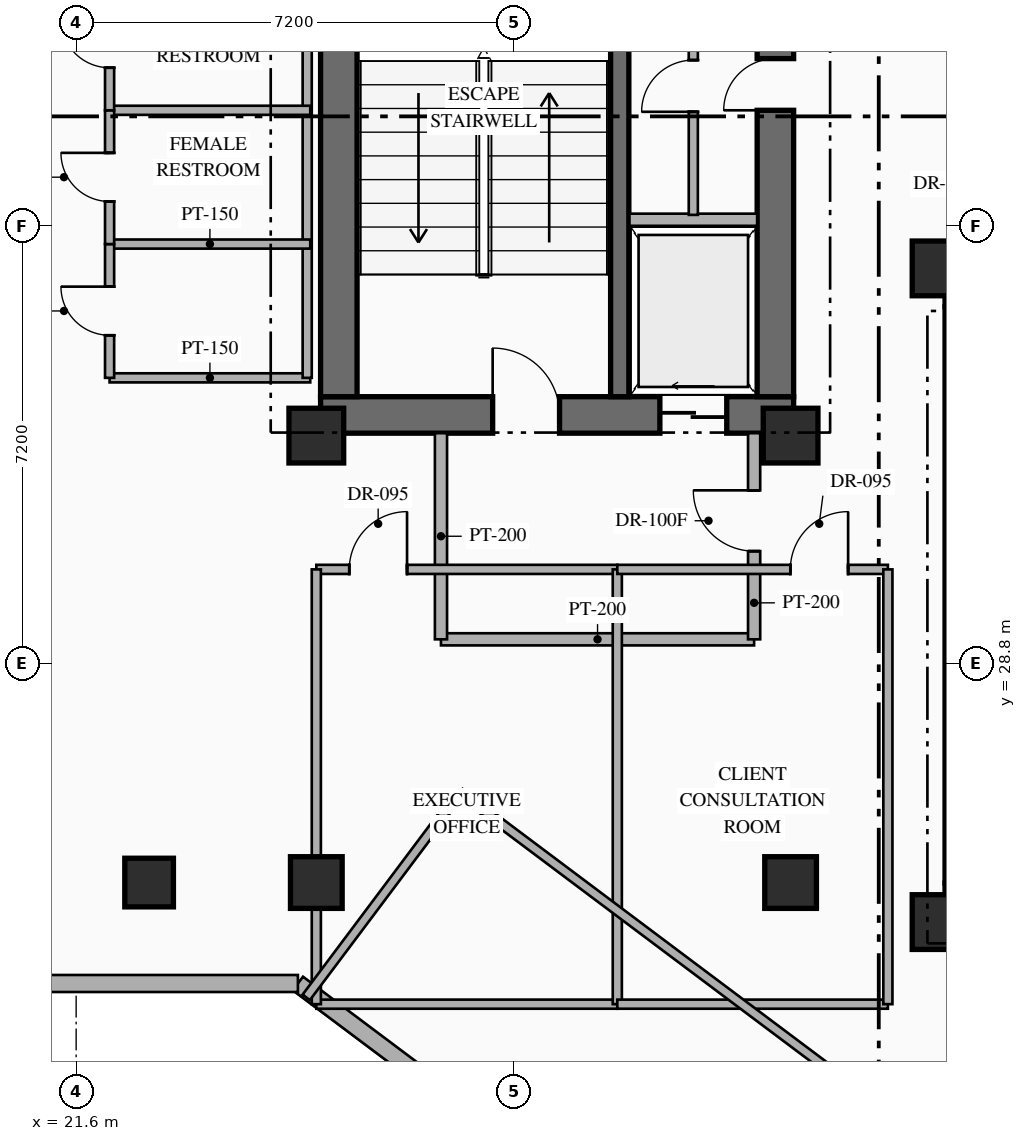
"""IFC4 building model, lengths in metres.
Left out: names, types, materials, properties, quantities, classifications, styles, units other than length and angle.
Written with IfcOpenShell. Run it as: python <this file> out.ifc"""

import sys

from ifc_helpers import new_model, si_unit, direction, frame, frame_2d, origin, origin_2d, place, context, subcontext, project, spatial, rectangle, hollow_rectangle, extrude, element, fill, save


model = new_model("IFC4")
c1 = context("Model", 3, precision=1e-05, world=origin(), true_north=direction((0.0, 1.0)))
c2 = subcontext(c1, "Body", "Model", "MODEL_VIEW")
j1 = project(units=[si_unit("LENGTHUNIT", "METRE"), si_unit("PLANEANGLEUNIT", "RADIAN")], contexts=[c1])
p1 = place(None, origin())
s1 = spatial("IfcSite", under=j1, at=p1, CompositionType="ELEMENT")
p2 = place(p1, origin())
s2 = spatial("IfcBuilding", under=s1, at=p2, CompositionType="ELEMENT")
p3 = place(p2, frame((0.0, 0.0, 142.05)))
s3 = spatial("IfcBuildingStorey", under=s2, at=p3, CompositionType="ELEMENT", Elevation=142.05)
p4 = place(p3, frame((25.62, 32.89, 0.0), z_axis=(0.0, 0.0, 1.0), x_axis=(1.0, 0.0, 0.0)))
e1 = element("IfcWall", 1, at=p4, inside=s3, PredefinedType="SHEAR", context=c2, shape_type="SweptSolid", body=[
    extrude(rectangle(XDim=7.78, YDim=0.6, at=frame_2d((3.89, 0.0))), origin(), (0.0, 0.0, 1.0), 3.6),
])
p5 = place(p4, frame((2.83, 0.0, 0.0)))
e2 = element("IfcOpeningElement", 2, at=p5, cuts=e1, PredefinedType="OPENING", context=c2, shape_type="SweptSolid", body=[
    extrude(rectangle(XDim=1.1, YDim=2.2, at=frame_2d((0.55, 1.1))), frame((0.0, 0.31, 0.0), z_axis=(0.0, -1.0, 0.0), x_axis=(1.0, 0.0, 0.0)), (0.0, 0.0, 1.0), 0.62),
])
p6 = place(p4, frame((5.58, 0.0, 0.0)))
e3 = element("IfcOpeningElement", 3, at=p6, cuts=e1, PredefinedType="OPENING", context=c2, shape_type="SweptSolid", body=[
    extrude(rectangle(XDim=1.1, YDim=2.15, at=frame_2d((0.55, 1.075))), frame((0.0, 0.31, 0.0), z_axis=(0.0, -1.0, 0.0), x_axis=(1.0, 0.0, 0.0)), (0.0, 0.0, 1.0), 0.62),
])
p7 = place(p3, frame((25.92, 33.19, 0.0), z_axis=(0.0, 0.0, 1.0), x_axis=(0.0, 1.0, 0.0)))
e4 = element("IfcWall", 4, at=p7, inside=s3, PredefinedType="SHEAR", context=c2, shape_type="SweptSolid", body=[
    extrude(rectangle(XDim=9.48, YDim=0.6, at=frame_2d((4.74, 0.0))), origin(), (0.0, 0.0, 1.0), 3.6),
])
p8 = place(p3, frame((33.1, 33.19, 0.0), z_axis=(0.0, 0.0, 1.0), x_axis=(0.0, 1.0, 0.0)))
e5 = element("IfcWall", 5, at=p8, inside=s3, PredefinedType="SHEAR", context=c2, shape_type="SweptSolid", body=[
    extrude(rectangle(XDim=9.48, YDim=0.6, at=frame_2d((4.74, 0.0))), origin(), (0.0, 0.0, 1.0), 3.6),
])
p9 = place(p8, frame((4.71, 0.0, 0.0)))
e6 = element("IfcOpeningElement", 6, at=p9, cuts=e5, PredefinedType="OPENING", context=c2, shape_type="SweptSolid", body=[
    extrude(rectangle(XDim=0.85, YDim=2.08, at=frame_2d((0.425, 1.04))), frame((0.0, 0.31, 0.0), z_axis=(0.0, -1.0, 0.0), x_axis=(1.0, 0.0, 0.0)), (0.0, 0.0, 1.0), 0.62),
])
p10 = place(p8, frame((7.76, 0.0, 0.0)))
e7 = element("IfcOpeningElement", 7, at=p10, cuts=e5, PredefinedType="OPENING", context=c2, shape_type="SweptSolid", body=[
    extrude(rectangle(XDim=0.85, YDim=2.08, at=frame_2d((0.425, 1.04))), frame((0.0, 0.31, 0.0), z_axis=(0.0, -1.0, 0.0), x_axis=(1.0, 0.0, 0.0)), (0.0, 0.0, 1.0), 0.62),
])
p11 = place(p3, frame((30.54, 33.19, 0.0), z_axis=(0.0, 0.0, 1.0), x_axis=(0.0, 1.0, 0.0)))
e8 = element("IfcWall", 8, at=p11, inside=s3, PredefinedType="SHEAR", context=c2, shape_type="SweptSolid", body=[
    extrude(rectangle(XDim=9.48, YDim=0.3, at=frame_2d((4.74, 0.0))), origin(), (0.0, 0.0, 1.0), 3.6),
])
p12 = place(p3, frame((35.89, 24.89, 0.0), z_axis=(0.0, 0.0, 1.0), x_axis=(1.0, 0.0, 0.0)))
e9 = element("IfcWall", 9, at=p12, inside=s3, PredefinedType="SHEAR", context=c2, shape_type="SweptSolid", body=[
    extrude(rectangle(XDim=7.76, YDim=0.6, at=frame_2d((3.88, 0.0))), origin(), (0.0, 0.0, 1.0), 3.6),
])
p13 = place(p3, frame((35.89, 34.97, 0.0), z_axis=(0.0, 0.0, 1.0), x_axis=(1.0, 0.0, 0.0)))
e10 = element("IfcWall", 10, at=p13, inside=s3, PredefinedType="SHEAR", context=c2, shape_type="SweptSolid", body=[
    extrude(rectangle(XDim=7.76, YDim=0.6, at=frame_2d((3.88, 0.0))), origin(), (0.0, 0.0, 1.0), 3.6),
])
p14 = place(p13, frame((2.66, 0.0, 0.0)))
e11 = element("IfcOpeningElement", 11, at=p14, cuts=e10, PredefinedType="OPENING", context=c2, shape_type="SweptSolid", body=[
    extrude(rectangle(XDim=1.1, YDim=2.2, at=frame_2d((0.55, 1.1))), frame((0.0, 0.31, 0.0), z_axis=(0.0, -1.0, 0.0), x_axis=(1.0, 0.0, 0.0)), (0.0, 0.0, 1.0), 0.62),
])
p15 = place(p13, frame((5.56, 0.0, 0.0)))
e12 = element("IfcOpeningElement", 12, at=p15, cuts=e10, PredefinedType="OPENING", context=c2, shape_type="SweptSolid", body=[
    extrude(rectangle(XDim=1.12, YDim=2.15, at=frame_2d((0.56, 1.075))), frame((0.0, 0.31, 0.0), z_axis=(0.0, -1.0, 0.0), x_axis=(1.0, 0.0, 0.0)), (0.0, 0.0, 1.0), 0.62),
])
p16 = place(p3, frame((36.19, 25.19, 0.0), z_axis=(0.0, 0.0, 1.0), x_axis=(0.0, 1.0, 0.0)))
e13 = element("IfcWall", 13, at=p16, inside=s3, PredefinedType="SHEAR", context=c2, shape_type="SweptSolid", body=[
    extrude(rectangle(XDim=9.48, YDim=0.6, at=frame_2d((4.74, 0.0))), origin(), (0.0, 0.0, 1.0), 3.6),
])
for number, where, z_axis, x_axis in (
    (14, (25.55, 32.55, 0.0), (0.0, 0.0, 1.0), (1.0, 0.0, 0.0)),
    (15, (33.35, 32.55, 0.0), (0.0, 0.0, 1.0), (1.0, 0.0, 0.0)),
    (16, (35.8, 24.55, 0.0), (0.0, 0.0, 1.0), (1.0, 0.0, 0.0)),
    (17, (35.8, 35.3, 0.0), (0.0, 0.0, 1.0), (1.0, 0.0, 0.0)),
):
    element("IfcColumn", number, at=place(p3, frame(where, z_axis=z_axis, x_axis=x_axis)), inside=s3, PredefinedType="COLUMN", context=c2, shape_type="SweptSolid", body=[
        extrude(rectangle(XDim=0.9, YDim=0.9, at=origin_2d()), origin(), (0.0, 0.0, 1.0), 3.6),
    ])
for number, where, z_axis, x_axis in (
    (18, (25.55, 25.2, 0.0), (0.0, 0.0, 1.0), (1.0, 0.0, 0.0)),
    (19, (33.35, 25.2, 0.0), (0.0, 0.0, 1.0), (1.0, 0.0, 0.0)),
):
    element("IfcColumn", number, at=place(p3, frame(where, z_axis=z_axis, x_axis=x_axis)), inside=s3, PredefinedType="COLUMN", context=c2, shape_type="SweptSolid", body=[
        extrude(hollow_rectangle(XDim=0.85, YDim=0.85, WallThickness=0.032, at=origin_2d()), origin(), (0.0, 0.0, 1.0), 3.6),
    ])
p17 = place(p3, frame((22.8, 25.2, 0.0), z_axis=(0.0, 0.0, 1.0), x_axis=(1.0, 0.0, 0.0)))
e20 = element("IfcColumn", 20, at=p17, inside=s3, PredefinedType="COLUMN", context=c2, shape_type="SweptSolid", body=[
    extrude(hollow_rectangle(XDim=0.8, YDim=0.8, WallThickness=0.032, at=origin_2d()), origin(), (0.0, 0.0, 1.0), 3.6),
])
p18 = place(p3, frame((44.918, 8.787, 0.0), z_axis=(0.0, 0.0, 1.0), x_axis=(-0.800004765927, 0.599993645378, 0.0)))
e21 = element("IfcWall", 21, at=p18, inside=s3, PredefinedType="STANDARD", context=c2, shape_type="SweptSolid", body=[
    extrude(rectangle(XDim=24.588, YDim=0.28, at=frame_2d((12.294, 0.0))), origin(), (0.0, 0.0, 1.0), 3.35),
])
p19 = place(p3, frame((25.247, 23.54, 0.0), z_axis=(0.0, 0.0, 1.0), x_axis=(-1.0, 0.0, 0.0)))
e22 = element("IfcWall", 22, at=p19, inside=s3, PredefinedType="STANDARD", context=c2, shape_type="SweptSolid", body=[
    extrude(rectangle(XDim=6.747, YDim=0.28, at=frame_2d((3.374, 0.0))), origin(), (0.0, 0.0, 1.0), 3.35),
])
p20 = place(p3, frame((30.7, 36.1, 0.0), z_axis=(0.0, 0.0, 1.0), x_axis=(1.0, 0.0, 0.0)))
e23 = element("IfcWall", 23, at=p20, inside=s3, PredefinedType="STANDARD", context=c2, shape_type="SweptSolid", body=[
    extrude(rectangle(XDim=2.1, YDim=0.2, at=frame_2d((1.05, 0.0))), origin(), (0.0, 0.0, 1.0), 3.35),
])
p21 = place(p3, frame((31.75, 36.18, 0.0), z_axis=(0.0, 0.0, 1.0), x_axis=(0.0, 1.0, 0.0)))
e24 = element("IfcWall", 24, at=p21, inside=s3, PredefinedType="PARTITIONING", context=c2, shape_type="SweptSolid", body=[
    extrude(rectangle(XDim=4.24, YDim=0.15, at=frame_2d((2.12, 0.0))), origin(), (0.0, 0.0, 1.0), 3.35),
])
p22 = place(p21, frame((1.695, 0.0, 0.0)))
e25 = element("IfcOpeningElement", 25, at=p22, cuts=e24, PredefinedType="OPENING", context=c2, shape_type="SweptSolid", body=[
    extrude(rectangle(XDim=0.85, YDim=2.08, at=frame_2d((0.425, 1.04))), frame((0.0, 0.085, 0.0), z_axis=(0.0, -1.0, 0.0), x_axis=(1.0, 0.0, 0.0)), (0.0, 0.0, 1.0), 0.17),
])
p23 = place(p3, frame((27.6, 29.2, 0.0), z_axis=(0.0, 0.0, 1.0), x_axis=(1.0, 0.0, 0.0)))
e26 = element("IfcWall", 26, at=p23, inside=s3, PredefinedType="STANDARD", context=c2, shape_type="SweptSolid", body=[
    extrude(rectangle(XDim=5.15, YDim=0.2, at=frame_2d((2.575, 0.0))), origin(), (0.0, 0.0, 1.0), 3.35),
])
p24 = place(p3, frame((27.6, 29.2, 0.0), z_axis=(0.0, 0.0, 1.0), x_axis=(0.0, 1.0, 0.0)))
e27 = element("IfcWall", 27, at=p24, inside=s3, PredefinedType="STANDARD", context=c2, shape_type="SweptSolid", body=[
    extrude(rectangle(XDim=3.39, YDim=0.2, at=frame_2d((1.695, 0.0))), origin(), (0.0, 0.0, 1.0), 3.35),
])
p25 = place(p3, frame((32.75, 29.2, 0.0), z_axis=(0.0, 0.0, 1.0), x_axis=(0.0, 1.0, 0.0)))
e28 = element("IfcWall", 28, at=p25, inside=s3, PredefinedType="STANDARD", context=c2, shape_type="SweptSolid", body=[
    extrude(rectangle(XDim=3.39, YDim=0.2, at=frame_2d((1.695, 0.0))), origin(), (0.0, 0.0, 1.0), 3.35),
])
p26 = place(p25, frame((1.45, 0.0, 0.0)))
e29 = element("IfcOpeningElement", 29, at=p26, cuts=e28, PredefinedType="OPENING", context=c2, shape_type="SweptSolid", body=[
    extrude(rectangle(XDim=1.0, YDim=2.2, at=frame_2d((0.5, 1.1))), frame((0.0, 0.11, 0.0), z_axis=(0.0, -1.0, 0.0), x_axis=(1.0, 0.0, 0.0)), (0.0, 0.0, 1.0), 0.22),
])
p27 = place(p3, frame((22.15, 33.5, 0.0), z_axis=(0.0, 0.0, 1.0), x_axis=(1.0, 0.0, 0.0)))
e30 = element("IfcWall", 30, at=p27, inside=s3, PredefinedType="PARTITIONING", context=c2, shape_type="SweptSolid", body=[
    extrude(rectangle(XDim=3.3, YDim=0.15, at=frame_2d((1.65, 0.0))), origin(), (0.0, 0.0, 1.0), 3.35),
])
p28 = place(p3, frame((25.4, 33.5, 0.0), z_axis=(0.0, 0.0, 1.0), x_axis=(0.0, 1.0, 0.0)))
e31 = element("IfcWall", 31, at=p28, inside=s3, PredefinedType="PARTITIONING", context=c2, shape_type="SweptSolid", body=[
    extrude(rectangle(XDim=6.6, YDim=0.15, at=frame_2d((3.3, 0.0))), origin(), (0.0, 0.0, 1.0), 3.35),
])
for number, where, z_axis, x_axis in (
    (32, (22.15, 35.7, 0.0), (0.0, 0.0, 1.0), (1.0, 0.0, 0.0)),
    (33, (22.15, 37.9, 0.0), (0.0, 0.0, 1.0), (1.0, 0.0, 0.0)),
):
    element("IfcWall", number, at=place(p3, frame(where, z_axis=z_axis, x_axis=x_axis)), inside=s3, PredefinedType="PARTITIONING", context=c2, shape_type="SweptSolid", body=[
        extrude(rectangle(XDim=3.3, YDim=0.15, at=frame_2d((1.65, 0.0))), origin(), (0.0, 0.0, 1.0), 3.35),
    ])
p29 = place(p3, frame((22.15, 33.5, 0.0), z_axis=(0.0, 0.0, 1.0), x_axis=(0.0, 1.0, 0.0)))
e34 = element("IfcWall", 34, at=p29, inside=s3, PredefinedType="PARTITIONING", context=c2, shape_type="SweptSolid", body=[
    extrude(rectangle(XDim=2.2, YDim=0.15, at=frame_2d((1.1, 0.0))), origin(), (0.0, 0.0, 1.0), 3.35),
])
p30 = place(p29, frame((0.7, 0.0, 0.0)))
e35 = element("IfcOpeningElement", 35, at=p30, cuts=e34, PredefinedType="OPENING", context=c2, shape_type="SweptSolid", body=[
    extrude(rectangle(XDim=0.8, YDim=2.06, at=frame_2d((0.4, 1.03))), frame((0.0, 0.085, 0.0), z_axis=(0.0, -1.0, 0.0), x_axis=(1.0, 0.0, 0.0)), (0.0, 0.0, 1.0), 0.17),
])
p31 = place(p3, frame((22.15, 35.7, 0.0), z_axis=(0.0, 0.0, 1.0), x_axis=(0.0, 1.0, 0.0)))
e36 = element("IfcWall", 36, at=p31, inside=s3, PredefinedType="PARTITIONING", context=c2, shape_type="SweptSolid", body=[
    extrude(rectangle(XDim=2.2, YDim=0.15, at=frame_2d((1.1, 0.0))), origin(), (0.0, 0.0, 1.0), 3.35),
])
p32 = place(p31, frame((0.7, 0.0, 0.0)))
e37 = element("IfcOpeningElement", 37, at=p32, cuts=e36, PredefinedType="OPENING", context=c2, shape_type="SweptSolid", body=[
    extrude(rectangle(XDim=0.8, YDim=2.06, at=frame_2d((0.4, 1.03))), frame((0.0, 0.085, 0.0), z_axis=(0.0, -1.0, 0.0), x_axis=(1.0, 0.0, 0.0)), (0.0, 0.0, 1.0), 0.17),
])
p33 = place(p3, frame((22.15, 37.9, 0.0), z_axis=(0.0, 0.0, 1.0), x_axis=(0.0, 1.0, 0.0)))
e38 = element("IfcWall", 38, at=p33, inside=s3, PredefinedType="PARTITIONING", context=c2, shape_type="SweptSolid", body=[
    extrude(rectangle(XDim=2.2, YDim=0.15, at=frame_2d((1.1, 0.0))), origin(), (0.0, 0.0, 1.0), 3.35),
])
p34 = place(p33, frame((0.7, 0.0, 0.0)))
e39 = element("IfcOpeningElement", 39, at=p34, cuts=e38, PredefinedType="OPENING", context=c2, shape_type="SweptSolid", body=[
    extrude(rectangle(XDim=0.8, YDim=2.06, at=frame_2d((0.4, 1.03))), frame((0.0, 0.085, 0.0), z_axis=(0.0, -1.0, 0.0), x_axis=(1.0, 0.0, 0.0)), (0.0, 0.0, 1.0), 0.17),
])
p35 = place(p3, frame((25.55, 23.2, 0.0), z_axis=(0.0, 0.0, 1.0), x_axis=(1.0, 0.0, 0.0)))
e40 = element("IfcWall", 40, at=p35, inside=s3, PredefinedType="PARTITIONING", context=c2, shape_type="SweptSolid", body=[
    extrude(rectangle(XDim=4.95, YDim=0.15, at=frame_2d((2.475, 0.0))), origin(), (0.0, 0.0, 1.0), 3.35),
])
p36 = place(p3, frame((25.55, 30.35, 0.0), z_axis=(0.0, 0.0, 1.0), x_axis=(1.0, 0.0, 0.0)))
e41 = element("IfcWall", 41, at=p36, inside=s3, PredefinedType="PARTITIONING", context=c2, shape_type="SweptSolid", body=[
    extrude(rectangle(XDim=4.95, YDim=0.15, at=frame_2d((2.475, 0.0))), origin(), (0.0, 0.0, 1.0), 3.35),
])
p37 = place(p36, frame((0.542, 0.0, 0.0)))
e42 = element("IfcOpeningElement", 42, at=p37, cuts=e41, PredefinedType="OPENING", context=c2, shape_type="SweptSolid", body=[
    extrude(rectangle(XDim=0.95, YDim=2.15, at=frame_2d((0.475, 1.075))), frame((0.0, 0.085, 0.0), z_axis=(0.0, -1.0, 0.0), x_axis=(1.0, 0.0, 0.0)), (0.0, 0.0, 1.0), 0.17),
])
p38 = place(p3, frame((25.55, 23.2, 0.0), z_axis=(0.0, 0.0, 1.0), x_axis=(0.0, 1.0, 0.0)))
e43 = element("IfcWall", 43, at=p38, inside=s3, PredefinedType="PARTITIONING", context=c2, shape_type="SweptSolid", body=[
    extrude(rectangle(XDim=7.15, YDim=0.15, at=frame_2d((3.575, 0.0))), origin(), (0.0, 0.0, 1.0), 2.695),
])
p39 = place(p3, frame((30.5, 23.2, 0.0), z_axis=(0.0, 0.0, 1.0), x_axis=(0.0, 1.0, 0.0)))
e44 = element("IfcWall", 44, at=p39, inside=s3, PredefinedType="PARTITIONING", context=c2, shape_type="SweptSolid", body=[
    extrude(rectangle(XDim=7.15, YDim=0.15, at=frame_2d((3.575, 0.0))), origin(), (0.0, 0.0, 1.0), 3.35),
])
p40 = place(p3, frame((30.5, 23.2, 0.0), z_axis=(0.0, 0.0, 1.0), x_axis=(1.0, 0.0, 0.0)))
e45 = element("IfcWall", 45, at=p40, inside=s3, PredefinedType="PARTITIONING", context=c2, shape_type="SweptSolid", body=[
    extrude(rectangle(XDim=4.45, YDim=0.15, at=frame_2d((2.225, 0.0))), origin(), (0.0, 0.0, 1.0), 3.35),
])
p41 = place(p3, frame((30.5, 30.35, 0.0), z_axis=(0.0, 0.0, 1.0), x_axis=(1.0, 0.0, 0.0)))
e46 = element("IfcWall", 46, at=p41, inside=s3, PredefinedType="PARTITIONING", context=c2, shape_type="SweptSolid", body=[
    extrude(rectangle(XDim=4.45, YDim=0.15, at=frame_2d((2.225, 0.0))), origin(), (0.0, 0.0, 1.0), 3.35),
])
p42 = place(p41, frame((2.846, 0.0, 0.0)))
e47 = element("IfcOpeningElement", 47, at=p42, cuts=e46, PredefinedType="OPENING", context=c2, shape_type="SweptSolid", body=[
    extrude(rectangle(XDim=0.95, YDim=2.15, at=frame_2d((0.475, 1.075))), frame((0.0, 0.085, 0.0), z_axis=(0.0, -1.0, 0.0), x_axis=(1.0, 0.0, 0.0)), (0.0, 0.0, 1.0), 0.17),
])
p43 = place(p3, frame((34.95, 23.2, 0.0), z_axis=(0.0, 0.0, 1.0), x_axis=(0.0, 1.0, 0.0)))
e48 = element("IfcWall", 48, at=p43, inside=s3, PredefinedType="PARTITIONING", context=c2, shape_type="SweptSolid", body=[
    extrude(rectangle(XDim=7.15, YDim=0.15, at=frame_2d((3.575, 0.0))), origin(), (0.0, 0.0, 1.0), 3.35),
])
p44 = place(p3, frame((27.91, 26.68, 0.0), z_axis=(0.0, 0.0, 1.0), x_axis=(0.800005938517, -0.599992081896, 0.0)))
e49 = element("IfcWall", 49, at=p44, inside=s3, PredefinedType="PARTITIONING", context=c2, shape_type="SweptSolid", body=[
    extrude(rectangle(XDim=14.8, YDim=0.15, at=frame_2d((7.4, 0.0))), origin(), (0.0, 0.0, 1.0), 3.35),
])
p45 = place(p44, frame((9.281, 0.0, 0.0)))
e50 = element("IfcOpeningElement", 50, at=p45, cuts=e49, PredefinedType="OPENING", context=c2, shape_type="SweptSolid", body=[
    extrude(rectangle(XDim=0.95, YDim=2.15, at=frame_2d((0.475, 1.075))), frame((0.0, 0.085, 0.0), z_axis=(0.0, -1.0, 0.0), x_axis=(1.0, 0.0, 0.0)), (0.0, 0.0, 1.0), 0.17),
])
p46 = place(p3, frame((25.384, 23.312, 0.0), z_axis=(0.0, 0.0, 1.0), x_axis=(0.599990721155, 0.80000695905, 0.0)))
e51 = element("IfcWall", 51, at=p46, inside=s3, PredefinedType="PARTITIONING", context=c2, shape_type="SweptSolid", body=[
    extrude(rectangle(XDim=4.21, YDim=0.15, at=frame_2d((2.105, 0.0))), origin(), (0.0, 0.0, 1.0), 3.35),
])
p47 = place(p5, origin())
e52 = element("IfcDoor", 52, at=p47, inside=s3, OperationType="SINGLE_SWING_LEFT", PredefinedType="DOOR", context=c2, shape_type="SweptSolid", body=[
    extrude(rectangle(XDim=1.1, YDim=2.2, at=frame_2d((0.55, 1.1))), frame((0.0, 0.025, 0.0), z_axis=(0.0, -1.0, 0.0), x_axis=(1.0, 0.0, 0.0)), (0.0, 0.0, 1.0), 0.05),
])
fill(e2, e52)
p48 = place(p6, origin())
e53 = element("IfcDoor", 53, at=p48, inside=s3, OperationType="SLIDING_TO_LEFT", PredefinedType="USERDEFINED", context=c2, shape_type="SweptSolid", body=[
    extrude(rectangle(XDim=1.1, YDim=2.15, at=frame_2d((0.55, 1.075))), frame((0.0, 0.025, 0.0), z_axis=(0.0, -1.0, 0.0), x_axis=(1.0, 0.0, 0.0)), (0.0, 0.0, 1.0), 0.05),
])
fill(e3, e53)
p49 = place(p9, origin())
e54 = element("IfcDoor", 54, at=p49, inside=s3, OperationType="SINGLE_SWING_LEFT", PredefinedType="DOOR", context=c2, shape_type="SweptSolid", body=[
    extrude(rectangle(XDim=0.85, YDim=2.08, at=frame_2d((0.425, 1.04))), frame((0.0, 0.025, 0.0), z_axis=(0.0, -1.0, 0.0), x_axis=(1.0, 0.0, 0.0)), (0.0, 0.0, 1.0), 0.05),
])
fill(e6, e54)
p50 = place(p22, origin())
e55 = element("IfcDoor", 55, at=p50, inside=s3, OperationType="SINGLE_SWING_LEFT", PredefinedType="DOOR", context=c2, shape_type="SweptSolid", body=[
    extrude(rectangle(XDim=0.85, YDim=2.08, at=frame_2d((0.425, 1.04))), frame((0.0, 0.025, 0.0), z_axis=(0.0, -1.0, 0.0), x_axis=(1.0, 0.0, 0.0)), (0.0, 0.0, 1.0), 0.05),
])
fill(e25, e55)
p51 = place(p26, origin())
e56 = element("IfcDoor", 56, at=p51, inside=s3, OperationType="SINGLE_SWING_RIGHT", PredefinedType="DOOR", context=c2, shape_type="SweptSolid", body=[
    extrude(rectangle(XDim=1.0, YDim=2.2, at=frame_2d((0.5, 1.1))), frame((0.0, 0.025, 0.0), z_axis=(0.0, -1.0, 0.0), x_axis=(1.0, 0.0, 0.0)), (0.0, 0.0, 1.0), 0.05),
])
fill(e29, e56)
p52 = place(p30, origin())
e57 = element("IfcDoor", 57, at=p52, inside=s3, OperationType="SINGLE_SWING_RIGHT", PredefinedType="DOOR", context=c2, shape_type="SweptSolid", body=[
    extrude(rectangle(XDim=0.8, YDim=2.06, at=frame_2d((0.4, 1.03))), frame((0.0, 0.025, 0.0), z_axis=(0.0, -1.0, 0.0), x_axis=(1.0, 0.0, 0.0)), (0.0, 0.0, 1.0), 0.05),
])
fill(e35, e57)
p53 = place(p32, origin())
e58 = element("IfcDoor", 58, at=p53, inside=s3, OperationType="SINGLE_SWING_RIGHT", PredefinedType="DOOR", context=c2, shape_type="SweptSolid", body=[
    extrude(rectangle(XDim=0.8, YDim=2.06, at=frame_2d((0.4, 1.03))), frame((0.0, 0.025, 0.0), z_axis=(0.0, -1.0, 0.0), x_axis=(1.0, 0.0, 0.0)), (0.0, 0.0, 1.0), 0.05),
])
fill(e37, e58)
p54 = place(p34, origin())
e59 = element("IfcDoor", 59, at=p54, inside=s3, OperationType="SINGLE_SWING_RIGHT", PredefinedType="DOOR", context=c2, shape_type="SweptSolid", body=[
    extrude(rectangle(XDim=0.8, YDim=2.06, at=frame_2d((0.4, 1.03))), frame((0.0, 0.025, 0.0), z_axis=(0.0, -1.0, 0.0), x_axis=(1.0, 0.0, 0.0)), (0.0, 0.0, 1.0), 0.05),
])
fill(e39, e59)
p55 = place(p37, origin())
e60 = element("IfcDoor", 60, at=p55, inside=s3, OperationType="SINGLE_SWING_RIGHT", PredefinedType="DOOR", context=c2, shape_type="SweptSolid", body=[
    extrude(rectangle(XDim=0.95, YDim=2.15, at=frame_2d((0.475, 1.075))), frame((0.0, 0.025, 0.0), z_axis=(0.0, -1.0, 0.0), x_axis=(1.0, 0.0, 0.0)), (0.0, 0.0, 1.0), 0.05),
])
fill(e42, e60)
p56 = place(p42, origin())
e61 = element("IfcDoor", 61, at=p56, inside=s3, OperationType="SINGLE_SWING_RIGHT", PredefinedType="DOOR", context=c2, shape_type="SweptSolid", body=[
    extrude(rectangle(XDim=0.95, YDim=2.15, at=frame_2d((0.475, 1.075))), frame((0.0, 0.025, 0.0), z_axis=(0.0, -1.0, 0.0), x_axis=(1.0, 0.0, 0.0)), (0.0, 0.0, 1.0), 0.05),
])
fill(e47, e61)
save(model, sys.argv[1])
